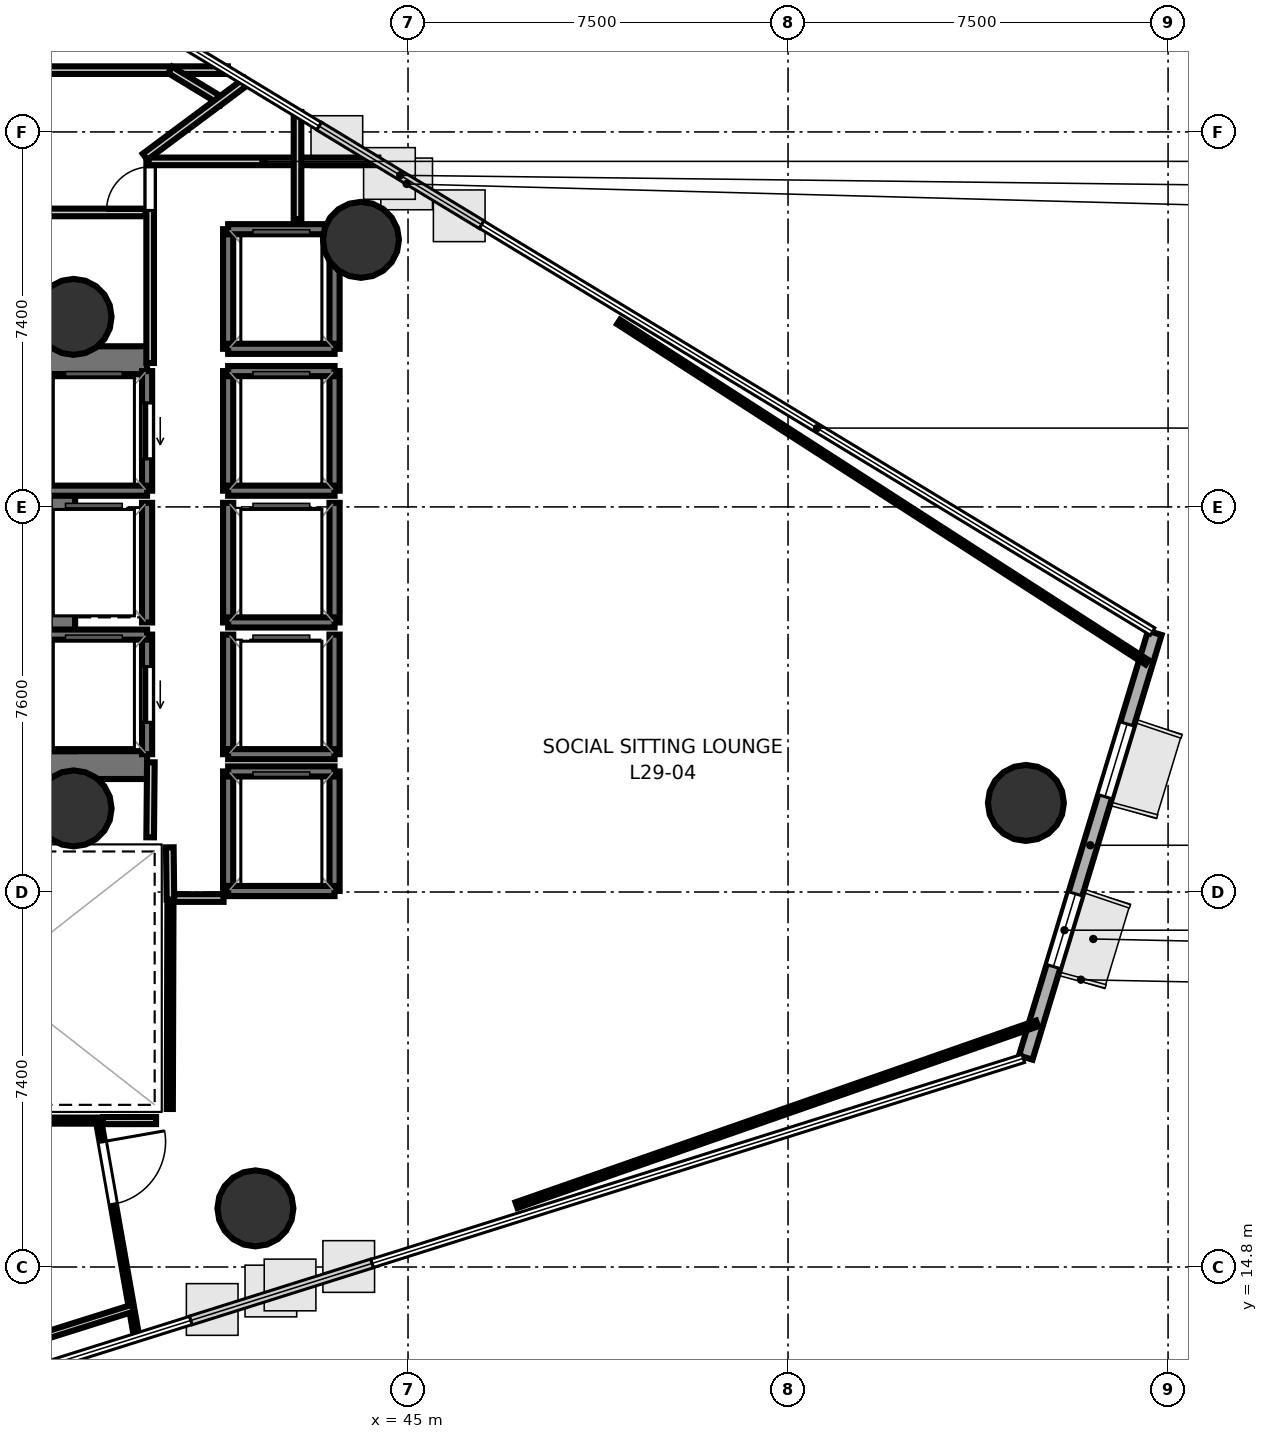
"""IFC4 building model, lengths in metres.
Left out: names, types, materials, properties, quantities, classifications, styles, units other than length and angle.
Written with IfcOpenShell. Run it as: python <this file> out.ifc"""

import sys

from ifc_helpers import new_model, si_unit, direction, frame, frame_2d, origin, origin_2d, place, context, subcontext, project, spatial, rectangle, hollow_circle, extrude, element, fill, save


model = new_model("IFC4")
c1 = context("Model", 3, precision=1e-05, world=origin(), true_north=direction((0.0, 1.0)))
c2 = subcontext(c1, "Body", "Model", "MODEL_VIEW")
j1 = project(units=[si_unit("LENGTHUNIT", "METRE"), si_unit("PLANEANGLEUNIT", "RADIAN")], contexts=[c1])
p1 = place(None, origin())
s1 = spatial("IfcSite", under=j1, at=p1, CompositionType="ELEMENT")
p2 = place(p1, origin())
s2 = spatial("IfcBuilding", under=s1, at=p2, CompositionType="ELEMENT")
p3 = place(p2, frame((0.0, 0.0, 116.3)))
s3 = spatial("IfcBuildingStorey", under=s2, at=p3, CompositionType="ELEMENT", Elevation=116.3)
p4 = place(p3, frame((29.23, 32.695, 0.0), z_axis=(0.0, 0.0, 1.0), x_axis=(1.0, 0.0, 0.0)))
e1 = element("IfcWall", 1, at=p4, inside=s3, PredefinedType="SHEAR", context=c2, shape_type="SweptSolid", body=[
    extrude(rectangle(XDim=10.62, YDim=0.55, at=frame_2d((5.31, 0.0))), origin(), (0.0, 0.0, 1.0), 3.52),
])
p5 = place(p4, frame((0.995, 0.0, 0.0)))
e2 = element("IfcOpeningElement", 2, at=p5, cuts=e1, PredefinedType="OPENING", context=c2, shape_type="SweptSolid", body=[
    extrude(rectangle(XDim=1.25, YDim=2.15, at=frame_2d((0.625, 1.075))), frame((0.0, 0.285, 0.0), z_axis=(0.0, -1.0, 0.0), x_axis=(1.0, 0.0, 0.0)), (0.0, 0.0, 1.0), 0.57),
])
p6 = place(p3, frame((29.23, 24.705, 0.0), z_axis=(0.0, 0.0, 1.0), x_axis=(1.0, 0.0, 0.0)))
e3 = element("IfcWall", 3, at=p6, inside=s3, PredefinedType="SHEAR", context=c2, shape_type="SweptSolid", body=[
    extrude(rectangle(XDim=10.62, YDim=0.55, at=frame_2d((5.31, 0.0))), origin(), (0.0, 0.0, 1.0), 3.52),
])
p7 = place(p6, frame((0.795, 0.0, 0.0)))
e4 = element("IfcOpeningElement", 4, at=p7, cuts=e3, PredefinedType="OPENING", context=c2, shape_type="SweptSolid", body=[
    extrude(rectangle(XDim=1.25, YDim=2.15, at=frame_2d((0.625, 1.075))), frame((0.0, 0.285, 0.0), z_axis=(0.0, -1.0, 0.0), x_axis=(1.0, 0.0, 0.0)), (0.0, 0.0, 1.0), 0.57),
])
p8 = place(p3, frame((38.18, 24.98, 0.0), z_axis=(0.0, 0.0, 1.0), x_axis=(0.0, 1.0, 0.0)))
e5 = element("IfcWall", 5, at=p8, inside=s3, PredefinedType="SHEAR", context=c2, shape_type="SweptSolid", body=[
    extrude(rectangle(XDim=7.44, YDim=0.5, at=frame_2d((3.72, 0.0))), origin(), (0.0, 0.0, 1.0), 3.52),
])
for number, where, z_axis, x_axis in (
    (6, (38.4, 33.55, 0.0), (0.0, 0.0, 1.0), (1.0, 0.0, 0.0)),
    (7, (38.4, 23.85, 0.0), (0.0, 0.0, 1.0), (1.0, 0.0, 0.0)),
    (8, (57.194, 23.958, 0.0), (0.0, 0.0, 1.0), (1.0, 0.0, 0.0)),
    (9, (44.071, 35.07, 0.0), (0.0, 0.0, 1.0), (1.0, 0.0, 0.0)),
    (10, (41.988, 15.957, 0.0), (0.0, 0.0, 1.0), (1.0, 0.0, 0.0)),
):
    element("IfcColumn", number, at=place(p3, frame(where, z_axis=z_axis, x_axis=x_axis)), inside=s3, PredefinedType="COLUMN", context=c2, shape_type="SweptSolid", body=[
        extrude(hollow_circle(Radius=0.75, WallThickness=0.036, at=origin_2d()), origin(), (0.0, 0.0, 1.0), 3.7),
    ])
p9 = place(p3, frame((57.191, 18.932, 0.0), z_axis=(0.0, 0.0, 1.0), x_axis=(0.290756814837, 0.956796987154, 0.0)))
e11 = element("IfcWall", 11, at=p9, inside=s3, PredefinedType="SOLIDWALL", context=c2, shape_type="SweptSolid", body=[
    extrude(rectangle(XDim=8.76, YDim=0.28, at=frame_2d((4.38, 0.0))), origin(), (0.0, 0.0, 1.0), 3.52),
])
p10 = place(p9, frame((1.878, 0.0, 0.85)))
e12 = element("IfcOpeningElement", 12, at=p10, cuts=e11, PredefinedType="OPENING", context=c2, shape_type="SweptSolid", body=[
    extrude(rectangle(XDim=1.5, YDim=2.1, at=frame_2d((0.75, 1.05))), frame((0.0, 0.15, 0.0), z_axis=(0.0, -1.0, 0.0), x_axis=(1.0, 0.0, 0.0)), (0.0, 0.0, 1.0), 0.3),
])
p11 = place(p9, frame((5.382, 0.0, 0.85)))
e13 = element("IfcOpeningElement", 13, at=p11, cuts=e11, PredefinedType="OPENING", context=c2, shape_type="SweptSolid", body=[
    extrude(rectangle(XDim=1.5, YDim=2.1, at=frame_2d((0.75, 1.05))), frame((0.0, 0.15, 0.0), z_axis=(0.0, -1.0, 0.0), x_axis=(1.0, 0.0, 0.0)), (0.0, 0.0, 1.0), 0.3),
])
p12 = place(p3, frame((29.7, 29.45, 0.0), z_axis=(0.0, 0.0, 1.0), x_axis=(1.0, 0.0, 0.0)))
e14 = element("IfcWall", 14, at=p12, inside=s3, PredefinedType="SOLIDWALL", context=c2, shape_type="SweptSolid", body=[
    extrude(rectangle(XDim=8.3, YDim=0.2, at=frame_2d((4.15, 0.0))), origin(), (0.0, 0.0, 1.0), 3.52),
])
p13 = place(p3, frame((39.85, 30.12, 0.0), z_axis=(0.0, 0.0, 1.0), x_axis=(0.0, 1.0, 0.0)))
e15 = element("IfcWall", 15, at=p13, inside=s3, PredefinedType="SOLIDWALL", context=c2, shape_type="SweptSolid", body=[
    extrude(rectangle(XDim=2.36, YDim=0.2, at=frame_2d((1.18, 0.0))), origin(), (0.0, 0.0, 1.0), 3.52),
])
p14 = place(p13, frame((0.63, 0.0, 0.0)))
e16 = element("IfcOpeningElement", 16, at=p14, cuts=e15, PredefinedType="OPENING", context=c2, shape_type="SweptSolid", body=[
    extrude(rectangle(XDim=1.1, YDim=2.15, at=frame_2d((0.55, 1.075))), frame((0.0, 0.11, 0.0), z_axis=(0.0, -1.0, 0.0), x_axis=(1.0, 0.0, 0.0)), (0.0, 0.0, 1.0), 0.22),
])
p15 = place(p3, frame((37.75, 30.12, 0.0), z_axis=(0.0, 0.0, 1.0), x_axis=(1.0, 0.0, 0.0)))
e17 = element("IfcWall", 17, at=p15, inside=s3, PredefinedType="SOLIDWALL", context=c2, shape_type="SweptSolid", body=[
    extrude(rectangle(XDim=2.1, YDim=0.2, at=frame_2d((1.05, 0.0))), origin(), (0.0, 0.0, 1.0), 3.52),
])
p16 = place(p3, frame((39.85, 24.92, 0.0), z_axis=(0.0, 0.0, 1.0), x_axis=(0.0, 1.0, 0.0)))
e18 = element("IfcWall", 18, at=p16, inside=s3, PredefinedType="SOLIDWALL", context=c2, shape_type="SweptSolid", body=[
    extrude(rectangle(XDim=2.36, YDim=0.2, at=frame_2d((1.18, 0.0))), origin(), (0.0, 0.0, 1.0), 3.52),
])
p17 = place(p16, frame((0.63, 0.0, 0.0)))
e19 = element("IfcOpeningElement", 19, at=p17, cuts=e18, PredefinedType="OPENING", context=c2, shape_type="SweptSolid", body=[
    extrude(rectangle(XDim=1.1, YDim=2.15, at=frame_2d((0.55, 1.075))), frame((0.0, 0.11, 0.0), z_axis=(0.0, -1.0, 0.0), x_axis=(1.0, 0.0, 0.0)), (0.0, 0.0, 1.0), 0.22),
])
p18 = place(p3, frame((37.75, 27.28, 0.0), z_axis=(0.0, 0.0, 1.0), x_axis=(1.0, 0.0, 0.0)))
e20 = element("IfcWall", 20, at=p18, inside=s3, PredefinedType="SOLIDWALL", context=c2, shape_type="SweptSolid", body=[
    extrude(rectangle(XDim=2.1, YDim=0.2, at=frame_2d((1.05, 0.0))), origin(), (0.0, 0.0, 1.0), 3.52),
])
for number, where, z_axis, x_axis in (
    (21, (43.55, 30.12, 0.0), (0.0, 0.0, 1.0), (0.0, 1.0, 0.0)),
    (22, (41.45, 30.12, 0.0), (0.0, 0.0, 1.0), (0.0, 1.0, 0.0)),
):
    element("IfcWall", number, at=place(p3, frame(where, z_axis=z_axis, x_axis=x_axis)), inside=s3, PredefinedType="SOLIDWALL", context=c2, shape_type="SweptSolid", body=[
        extrude(rectangle(XDim=2.36, YDim=0.2, at=frame_2d((1.18, 0.0))), origin(), (0.0, 0.0, 1.0), 3.52),
    ])
for number, where, z_axis, x_axis in (
    (23, (41.45, 32.48, 0.0), (0.0, 0.0, 1.0), (1.0, 0.0, 0.0)),
    (24, (41.45, 30.12, 0.0), (0.0, 0.0, 1.0), (1.0, 0.0, 0.0)),
):
    element("IfcWall", number, at=place(p3, frame(where, z_axis=z_axis, x_axis=x_axis)), inside=s3, PredefinedType="SOLIDWALL", context=c2, shape_type="SweptSolid", body=[
        extrude(rectangle(XDim=2.1, YDim=0.2, at=frame_2d((1.05, 0.0))), origin(), (0.0, 0.0, 1.0), 3.52),
    ])
for number, where, z_axis, x_axis in (
    (25, (43.55, 27.52, 0.0), (0.0, 0.0, 1.0), (0.0, 1.0, 0.0)),
    (26, (41.45, 27.52, 0.0), (0.0, 0.0, 1.0), (0.0, 1.0, 0.0)),
):
    element("IfcWall", number, at=place(p3, frame(where, z_axis=z_axis, x_axis=x_axis)), inside=s3, PredefinedType="SOLIDWALL", context=c2, shape_type="SweptSolid", body=[
        extrude(rectangle(XDim=2.36, YDim=0.2, at=frame_2d((1.18, 0.0))), origin(), (0.0, 0.0, 1.0), 3.52),
    ])
p19 = place(p3, frame((41.45, 27.52, 0.0), z_axis=(0.0, 0.0, 1.0), x_axis=(1.0, 0.0, 0.0)))
e27 = element("IfcWall", 27, at=p19, inside=s3, PredefinedType="SOLIDWALL", context=c2, shape_type="SweptSolid", body=[
    extrude(rectangle(XDim=2.1, YDim=0.2, at=frame_2d((1.05, 0.0))), origin(), (0.0, 0.0, 1.0), 3.52),
])
for number, where, z_axis, x_axis in (
    (28, (43.55, 24.92, 0.0), (0.0, 0.0, 1.0), (0.0, 1.0, 0.0)),
    (29, (41.45, 24.92, 0.0), (0.0, 0.0, 1.0), (0.0, 1.0, 0.0)),
):
    element("IfcWall", number, at=place(p3, frame(where, z_axis=z_axis, x_axis=x_axis)), inside=s3, PredefinedType="SOLIDWALL", context=c2, shape_type="SweptSolid", body=[
        extrude(rectangle(XDim=2.36, YDim=0.2, at=frame_2d((1.18, 0.0))), origin(), (0.0, 0.0, 1.0), 3.52),
    ])
p20 = place(p3, frame((41.45, 24.92, 0.0), z_axis=(0.0, 0.0, 1.0), x_axis=(1.0, 0.0, 0.0)))
e30 = element("IfcWall", 30, at=p20, inside=s3, PredefinedType="SOLIDWALL", context=c2, shape_type="SweptSolid", body=[
    extrude(rectangle(XDim=2.1, YDim=0.2, at=frame_2d((1.05, 0.0))), origin(), (0.0, 0.0, 1.0), 3.52),
])
p21 = place(p3, frame((39.85, 27.52, 0.0), z_axis=(0.0, 0.0, 1.0), x_axis=(0.0, 1.0, 0.0)))
e31 = element("IfcWall", 31, at=p21, inside=s3, PredefinedType="SOLIDWALL", context=c2, shape_type="SweptSolid", body=[
    extrude(rectangle(XDim=2.36, YDim=0.2, at=frame_2d((1.18, 0.0))), origin(), (0.0, 0.0, 1.0), 3.52),
])
for number, where, z_axis, x_axis in (
    (32, (43.55, 22.22, 0.0), (0.0, 0.0, 1.0), (0.0, 1.0, 0.0)),
    (33, (41.45, 22.22, 0.0), (0.0, 0.0, 1.0), (0.0, 1.0, 0.0)),
):
    element("IfcWall", number, at=place(p3, frame(where, z_axis=z_axis, x_axis=x_axis)), inside=s3, PredefinedType="SOLIDWALL", context=c2, shape_type="SweptSolid", body=[
        extrude(rectangle(XDim=2.36, YDim=0.2, at=frame_2d((1.18, 0.0))), origin(), (0.0, 0.0, 1.0), 3.52),
    ])
for number, where, z_axis, x_axis in (
    (34, (41.45, 24.58, 0.0), (0.0, 0.0, 1.0), (1.0, 0.0, 0.0)),
    (35, (41.45, 22.22, 0.0), (0.0, 0.0, 1.0), (1.0, 0.0, 0.0)),
):
    element("IfcWall", number, at=place(p3, frame(where, z_axis=z_axis, x_axis=x_axis)), inside=s3, PredefinedType="SOLIDWALL", context=c2, shape_type="SweptSolid", body=[
        extrude(rectangle(XDim=2.1, YDim=0.2, at=frame_2d((1.05, 0.0))), origin(), (0.0, 0.0, 1.0), 3.52),
    ])
for number, where, z_axis, x_axis in (
    (36, (43.55, 32.92, 0.0), (0.0, 0.0, 1.0), (0.0, 1.0, 0.0)),
    (37, (41.45, 32.92, 0.0), (0.0, 0.0, 1.0), (0.0, 1.0, 0.0)),
):
    element("IfcWall", number, at=place(p3, frame(where, z_axis=z_axis, x_axis=x_axis)), inside=s3, PredefinedType="SOLIDWALL", context=c2, shape_type="SweptSolid", body=[
        extrude(rectangle(XDim=2.36, YDim=0.2, at=frame_2d((1.18, 0.0))), origin(), (0.0, 0.0, 1.0), 3.52),
    ])
for number, where, z_axis, x_axis in (
    (38, (41.45, 35.28, 0.0), (0.0, 0.0, 1.0), (1.0, 0.0, 0.0)),
    (39, (41.45, 32.92, 0.0), (0.0, 0.0, 1.0), (1.0, 0.0, 0.0)),
):
    element("IfcWall", number, at=place(p3, frame(where, z_axis=z_axis, x_axis=x_axis)), inside=s3, PredefinedType="SOLIDWALL", context=c2, shape_type="SweptSolid", body=[
        extrude(rectangle(XDim=2.1, YDim=0.2, at=frame_2d((1.05, 0.0))), origin(), (0.0, 0.0, 1.0), 3.52),
    ])
p22 = place(p3, frame((39.911, 32.64, 0.0), z_axis=(0.0, 0.0, 1.0), x_axis=(0.0, 1.0, 0.0)))
e40 = element("IfcWall", 40, at=p22, inside=s3, PredefinedType="PARTITIONING", context=c2, shape_type="SweptSolid", body=[
    extrude(rectangle(XDim=4.01, YDim=0.15, at=frame_2d((2.005, 0.0))), origin(), (0.0, 0.0, 1.0), 2.84),
])
p23 = place(p22, frame((3.01, 0.0, 0.0)))
e41 = element("IfcOpeningElement", 41, at=p23, cuts=e40, PredefinedType="OPENING", context=c2, shape_type="SweptSolid", body=[
    extrude(rectangle(XDim=0.86, YDim=2.05, at=frame_2d((0.43, 1.025))), frame((0.0, 0.085, 0.0), z_axis=(0.0, -1.0, 0.0), x_axis=(1.0, 0.0, 0.0)), (0.0, 0.0, 1.0), 0.17),
])
p24 = place(p3, frame((39.88, 36.619, 0.0), z_axis=(0.0, 0.0, 1.0), x_axis=(1.0, 0.0, 0.0)))
e42 = element("IfcWall", 42, at=p24, inside=s3, PredefinedType="PARTITIONING", context=c2, shape_type="SweptSolid", body=[
    extrude(rectangle(XDim=4.533, YDim=0.15, at=frame_2d((2.267, 0.0))), origin(), (0.0, 0.0, 1.0), 2.84),
])
p25 = place(p3, frame((42.819, 37.594, 0.0), z_axis=(0.0, 0.0, 1.0), x_axis=(0.0, -1.0, 0.0)))
e43 = element("IfcWall", 43, at=p25, inside=s3, PredefinedType="PARTITIONING", context=c2, shape_type="SweptSolid", body=[
    extrude(rectangle(XDim=2.114, YDim=0.15, at=frame_2d((1.057, 0.0))), origin(), (0.0, 0.0, 1.0), 2.84),
])
p26 = place(p3, frame((41.36, 22.081, 0.0), z_axis=(0.0, 0.0, 1.0), x_axis=(-1.0, 0.0, 0.0)))
e44 = element("IfcWall", 44, at=p26, inside=s3, PredefinedType="PARTITIONING", context=c2, shape_type="SweptSolid", body=[
    extrude(rectangle(XDim=1.08, YDim=0.15, at=frame_2d((0.54, 0.0))), origin(), (0.0, 0.0, 1.0), 2.84),
])
p27 = place(p3, frame((40.311, 22.05, 0.0), z_axis=(0.0, 0.0, 1.0), x_axis=(-0.011836292006, 0.999929948642, 0.0)))
e45 = element("IfcWall", 45, at=p27, inside=s3, PredefinedType="PARTITIONING", context=c2, shape_type="SweptSolid", body=[
    extrude(rectangle(XDim=1.031, YDim=0.15, at=frame_2d((0.516, 0.0))), origin(), (0.0, 0.0, 1.0), 2.84),
])
p28 = place(p3, frame((39.911, 23.28, 0.0), z_axis=(0.0, 0.0, 1.0), x_axis=(0.009397771291, 0.999955839972, 0.0)))
e46 = element("IfcWall", 46, at=p28, inside=s3, PredefinedType="PARTITIONING", context=c2, shape_type="SweptSolid", body=[
    extrude(rectangle(XDim=1.481, YDim=0.15, at=frame_2d((0.74, 0.0))), origin(), (0.0, 0.0, 1.0), 2.84),
])
p29 = place(p3, frame((26.42, 38.419, 0.0), z_axis=(0.0, 0.0, 1.0), x_axis=(1.0, 0.0, 0.0)))
e47 = element("IfcWall", 47, at=p29, inside=s3, PredefinedType="PARTITIONING", context=c2, shape_type="SweptSolid", body=[
    extrude(rectangle(XDim=15.025, YDim=0.15, at=frame_2d((7.513, 0.0))), origin(), (0.0, 0.0, 1.0), 2.84),
])
p30 = place(p29, frame((6.597, 0.0, 0.0)))
e48 = element("IfcOpeningElement", 48, at=p30, cuts=e47, PredefinedType="OPENING", context=c2, shape_type="SweptSolid", body=[
    extrude(rectangle(XDim=1.25, YDim=2.2, at=frame_2d((0.625, 1.1))), frame((0.0, 0.085, 0.0), z_axis=(0.0, -1.0, 0.0), x_axis=(1.0, 0.0, 0.0)), (0.0, 0.0, 1.0), 0.17),
])
p31 = place(p3, frame((40.307, 38.424, 0.0), z_axis=(0.0, 0.0, 1.0), x_axis=(0.855008040292, -0.518614742401, 0.0)))
e49 = element("IfcWall", 49, at=p31, inside=s3, PredefinedType="PARTITIONING", context=c2, shape_type="SweptSolid", body=[
    extrude(rectangle(XDim=1.21, YDim=0.15, at=frame_2d((0.605, 0.0))), origin(), (0.0, 0.0, 1.0), 2.84),
])
p32 = place(p3, frame((41.816, 38.203, 0.0), z_axis=(0.0, 0.0, 1.0), x_axis=(-0.802067975303, -0.597232754454, 0.0)))
e50 = element("IfcWall", 50, at=p32, inside=s3, PredefinedType="PARTITIONING", context=c2, shape_type="SweptSolid", body=[
    extrude(rectangle(XDim=2.502, YDim=0.15, at=frame_2d((1.251, 0.0))), origin(), (0.0, 0.0, 1.0), 2.84),
])
p33 = place(p3, frame((39.818, 35.611, 0.0), z_axis=(0.0, 0.0, 1.0), x_axis=(-1.0, 0.0, 0.0)))
e51 = element("IfcWall", 51, at=p33, inside=s3, PredefinedType="PARTITIONING", context=c2, shape_type="SweptSolid", body=[
    extrude(rectangle(XDim=2.768, YDim=0.15, at=frame_2d((1.384, 0.0))), origin(), (0.0, 0.0, 1.0), 2.84),
])
p34 = place(p3, frame((33.573, 17.69, 0.0), z_axis=(0.0, 0.0, 1.0), x_axis=(0.999999973918, -0.000228393928, 0.0)))
e52 = element("IfcWall", 52, at=p34, inside=s3, PredefinedType="PARTITIONING", context=c2, shape_type="SweptSolid", body=[
    extrude(rectangle(XDim=5.345, YDim=0.12, at=frame_2d((2.672, 0.0))), origin(), (0.0, 0.0, 1.0), 2.84),
])
p35 = place(p3, frame((38.887, 17.715, 0.0), z_axis=(0.0, 0.0, 1.0), x_axis=(0.173658486217, -0.984805935281, 0.0)))
e53 = element("IfcWall", 53, at=p35, inside=s3, PredefinedType="PARTITIONING", context=c2, shape_type="SweptSolid", body=[
    extrude(rectangle(XDim=4.392, YDim=0.105, at=frame_2d((2.196, 0.0))), origin(), (0.0, 0.0, 1.0), 2.84),
])
p36 = place(p35, frame((0.451, 0.0, 0.0)))
e54 = element("IfcOpeningElement", 54, at=p36, cuts=e53, PredefinedType="OPENING", context=c2, shape_type="SweptSolid", body=[
    extrude(rectangle(XDim=1.25, YDim=2.2, at=frame_2d((0.625, 1.1))), frame((0.0, 0.062, 0.0), z_axis=(0.0, -1.0, 0.0), x_axis=(1.0, 0.0, 0.0)), (0.0, 0.0, 1.0), 0.125),
])
p37 = place(p3, frame((39.571, 13.99, 0.0), z_axis=(0.0, 0.0, 1.0), x_axis=(-0.953855016975, -0.300267558341, 0.0)))
e55 = element("IfcWall", 55, at=p37, inside=s3, PredefinedType="PARTITIONING", context=c2, shape_type="SweptSolid", body=[
    extrude(rectangle(XDim=11.229, YDim=0.14, at=frame_2d((5.614, 0.0))), origin(), (0.0, 0.0, 1.0), 2.84),
])
p38 = place(p3, frame((49.155, 33.451, 0.0), z_axis=(0.0, 0.0, 1.0), x_axis=(0.840707444032, -0.541489606132, 0.0)))
e56 = element("IfcWall", 56, at=p38, inside=s3, PredefinedType="PARTITIONING", context=c2, shape_type="SweptSolid", body=[
    extrude(rectangle(XDim=12.403, YDim=0.105, at=frame_2d((6.201, 0.0))), origin(), (0.0, 0.0, 1.0), 2.84),
])
p39 = place(p3, frame((57.413, 19.606, 0.0), z_axis=(0.0, 0.0, 1.0), x_axis=(-0.94413021174, -0.329572667677, 0.0)))
e57 = element("IfcWall", 57, at=p39, inside=s3, PredefinedType="PARTITIONING", context=c2, shape_type="SweptSolid", body=[
    extrude(rectangle(XDim=10.88, YDim=0.12, at=frame_2d((5.44, 0.0))), origin(), (0.0, 0.0, 1.0), 2.84),
])
p40 = place(p3, frame((38.98, 17.689, 0.0), z_axis=(0.0, 0.0, 1.0), x_axis=(0.999999565315, 0.000932400527, 0.0)))
e58 = element("IfcWall", 58, at=p40, inside=s3, PredefinedType="PARTITIONING", context=c2, shape_type="SweptSolid", body=[
    extrude(rectangle(XDim=1.047, YDim=0.14, at=frame_2d((0.524, 0.0))), origin(), (0.0, 0.0, 1.0), 2.84),
])
p41 = place(p3, frame((40.299, 17.919, 0.0), z_axis=(0.0, 0.0, 1.0), x_axis=(0.0030131236, 0.999995460533, 0.0)))
e59 = element("IfcWall", 59, at=p41, inside=s3, PredefinedType="PARTITIONING", context=c2, shape_type="SweptSolid", body=[
    extrude(rectangle(XDim=4.051, YDim=0.12, at=frame_2d((2.026, 0.0))), origin(), (0.0, 0.0, 1.0), 2.84),
])
p42 = place(p14, origin())
e60 = element("IfcDoor", 60, at=p42, inside=s3, OperationType="SLIDING_TO_LEFT", PredefinedType="DOOR", context=c2, shape_type="SweptSolid", body=[
    extrude(rectangle(XDim=1.1, YDim=2.15, at=frame_2d((0.55, 1.075))), frame((0.0, 0.025, 0.0), z_axis=(0.0, -1.0, 0.0), x_axis=(1.0, 0.0, 0.0)), (0.0, 0.0, 1.0), 0.05),
])
fill(e16, e60)
p43 = place(p17, origin())
e61 = element("IfcDoor", 61, at=p43, inside=s3, OperationType="SLIDING_TO_LEFT", PredefinedType="DOOR", context=c2, shape_type="SweptSolid", body=[
    extrude(rectangle(XDim=1.1, YDim=2.15, at=frame_2d((0.55, 1.075))), frame((0.0, 0.025, 0.0), z_axis=(0.0, -1.0, 0.0), x_axis=(1.0, 0.0, 0.0)), (0.0, 0.0, 1.0), 0.05),
])
fill(e19, e61)
p44 = place(p23, origin())
e62 = element("IfcDoor", 62, at=p44, inside=s3, OperationType="SINGLE_SWING_LEFT", PredefinedType="DOOR", context=c2, shape_type="SweptSolid", body=[
    extrude(rectangle(XDim=0.86, YDim=2.05, at=frame_2d((0.43, 1.025))), frame((0.0, 0.025, 0.0), z_axis=(0.0, -1.0, 0.0), x_axis=(1.0, 0.0, 0.0)), (0.0, 0.0, 1.0), 0.05),
])
fill(e41, e62)
p45 = place(p36, origin())
e63 = element("IfcDoor", 63, at=p45, inside=s3, OperationType="SINGLE_SWING_LEFT", PredefinedType="DOOR", context=c2, shape_type="SweptSolid", body=[
    extrude(rectangle(XDim=1.25, YDim=2.2, at=frame_2d((0.625, 1.1))), frame((0.0, 0.025, 0.0), z_axis=(0.0, -1.0, 0.0), x_axis=(1.0, 0.0, 0.0)), (0.0, 0.0, 1.0), 0.05),
])
fill(e54, e63)
p46 = place(p10, origin())
e64 = element("IfcWindow", 64, at=p46, inside=s3, PartitioningType="SINGLE_PANEL", PredefinedType="WINDOW", context=c2, shape_type="SweptSolid", body=[
    extrude(rectangle(XDim=1.5, YDim=2.1, at=frame_2d((0.75, 1.05))), frame((0.0, 0.03, 0.0), z_axis=(0.0, -1.0, 0.0), x_axis=(1.0, 0.0, 0.0)), (0.0, 0.0, 1.0), 0.06),
])
fill(e12, e64)
p47 = place(p11, origin())
e65 = element("IfcWindow", 65, at=p47, inside=s3, PartitioningType="SINGLE_PANEL", PredefinedType="WINDOW", context=c2, shape_type="SweptSolid", body=[
    extrude(rectangle(XDim=1.5, YDim=2.1, at=frame_2d((0.75, 1.05))), frame((0.0, 0.03, 0.0), z_axis=(0.0, -1.0, 0.0), x_axis=(1.0, 0.0, 0.0)), (0.0, 0.0, 1.0), 0.06),
])
fill(e13, e65)
save(model, sys.argv[1])
